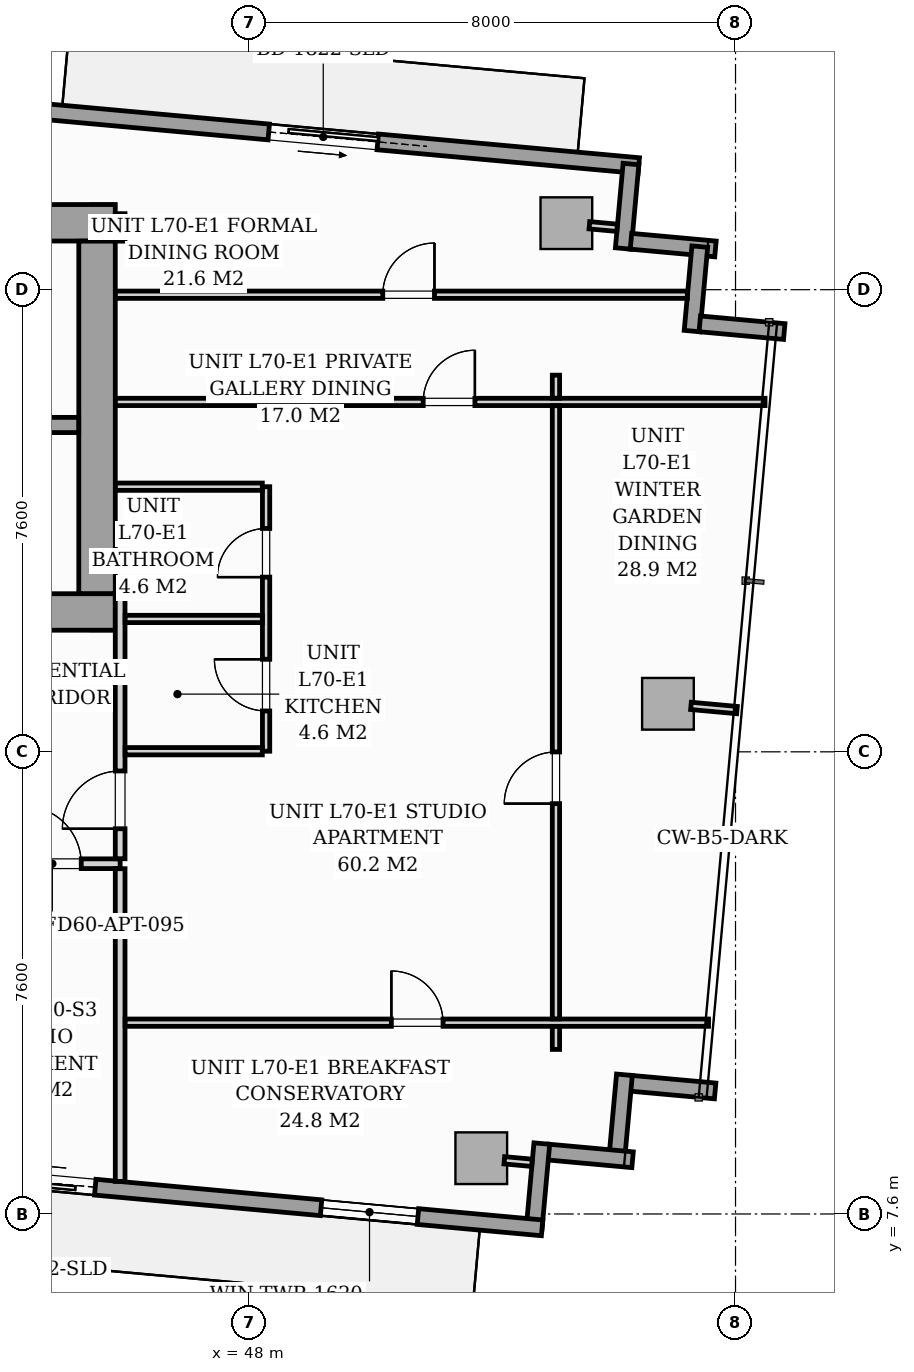
"""IFC4 building model, lengths in metres.
Left out: names, types, materials, properties, quantities, classifications, styles, units other than length and angle.
Written with IfcOpenShell. Run it as: python <this file> out.ifc"""

import sys

from ifc_helpers import new_model, si_unit, direction, frame, frame_2d, origin, origin_2d, place, context, subcontext, project, spatial, rectangle, i_section, extrude, source, transform, mapped, element, fill, save


model = new_model("IFC4")
c1 = context("Model", 3, precision=1e-05, world=origin(), true_north=direction((0.0, 1.0)))
c2 = subcontext(c1, "Body", "Model", "MODEL_VIEW")
j1 = project(units=[si_unit("LENGTHUNIT", "METRE"), si_unit("PLANEANGLEUNIT", "RADIAN")], contexts=[c1])
p1 = place(None, origin())
s1 = spatial("IfcSite", under=j1, at=p1, CompositionType="ELEMENT")
p2 = place(p1, origin())
s2 = spatial("IfcBuilding", under=s1, at=p2, CompositionType="ELEMENT")
p3 = place(p2, frame((0.0, 0.0, 243.0)))
s3 = spatial("IfcBuildingStorey", under=s2, at=p3, CompositionType="ELEMENT", Elevation=243.0)
m1 = source(origin(), c2, "Body", "SweptSolid", [
    extrude(i_section(OverallWidth=0.409, OverallDepth=0.425, WebThickness=0.033, FlangeThickness=0.052, FilletRadius=0.018, at=origin_2d()), origin(), (0.0, 0.0, 1.0), 3.296),
])
for number, where, z_axis, x_axis in (
    (1, (45.6, 17.4, 0.002), (0.0, 0.0, 1.0), (1.0, 0.0, 0.0)),
    (2, (45.6, 24.0, 0.002), (0.0, 0.0, 1.0), (1.0, 0.0, 0.0)),
):
    element("IfcColumn", number, at=place(p3, frame(where, z_axis=z_axis, x_axis=x_axis)), inside=s3, PredefinedType="PILASTER", context=c2, shape_type="MappedRepresentation", body=[
        mapped(m1, transform((0.0, 0.0, 0.0), scale=1.0)),
    ])
m2 = source(origin(), c2, "Body", "SweptSolid", [
    extrude(rectangle(XDim=0.85, YDim=0.85, at=origin_2d()), origin(), (0.0, 0.0, 1.0), 3.296),
])
for number, where, z_axis, x_axis in (
    (3, (51.819, 8.517, 0.002), (0.0, 0.0, 1.0), (0.996, -0.091, 0.0)),
    (4, (53.218, 23.894, 0.002), (0.0, 0.0, 1.0), (0.996, -0.091, 0.0)),
    (5, (54.889, 15.99, 0.002), (0.0, 0.0, 1.0), (0.996, -0.091, 0.0)),
):
    element("IfcColumn", number, at=place(p3, frame(where, z_axis=z_axis, x_axis=x_axis)), inside=s3, PredefinedType="COLUMN", context=c2, shape_type="MappedRepresentation", body=[
        mapped(m2, transform((0.0, 0.0, 0.0), scale=1.0)),
    ])
p4 = place(p3, frame((39.839, 26.166, 0.0), z_axis=(0.0, 0.0, 1.0), x_axis=(0.995884447498, -0.090632043071, 0.0)))
e6 = element("IfcWall", 6, at=p4, inside=s3, PredefinedType="STANDARD", context=c2, shape_type="SweptSolid", body=[
    extrude(rectangle(XDim=14.63, YDim=0.26, at=frame_2d((7.315, 0.0))), origin(), (0.0, 0.0, 1.0), 3.04),
])
p5 = place(p4, frame((8.52, 0.0, 0.0)))
e7 = element("IfcOpeningElement", 7, at=p5, cuts=e6, PredefinedType="OPENING", context=c2, shape_type="SweptSolid", body=[
    extrude(rectangle(XDim=1.8, YDim=2.06, at=frame_2d((0.9, 1.03))), frame((0.0, 0.14, 0.0), z_axis=(0.0, -1.0, 0.0), x_axis=(1.0, 0.0, 0.0)), (0.0, 0.0, 1.0), 0.28),
])
p6 = place(p4, frame((0.7, 0.0, 0.65)))
e8 = element("IfcOpeningElement", 8, at=p6, cuts=e6, PredefinedType="OPENING", context=c2, shape_type="SweptSolid", body=[
    extrude(rectangle(XDim=1.6, YDim=1.5, at=frame_2d((0.8, 0.75))), frame((0.0, 0.14, 0.0), z_axis=(0.0, -1.0, 0.0), x_axis=(1.0, 0.0, 0.0)), (0.0, 0.0, 1.0), 0.28),
])
p7 = place(p3, frame((54.281, 24.866, 0.0), z_axis=(0.0, 0.0, 1.0), x_axis=(-0.090661991521, -0.995881721538, 0.0)))
e9 = element("IfcWall", 9, at=p7, inside=s3, PredefinedType="STANDARD", context=c2, shape_type="SweptSolid", body=[
    extrude(rectangle(XDim=1.395, YDim=0.26, at=frame_2d((0.698, 0.0))), origin(), (0.0, 0.0, 1.0), 3.04),
])
for number, where, z_axis, x_axis in (
    (10, (54.281, 23.596, 0.0), (0.0, 0.0, 1.0), (0.996, -0.091, 0.0)),
    (11, (55.412, 23.508, 0.0), (0.0, 0.0, 1.0), (-0.091, -0.996, 0.0)),
    (12, (55.412, 22.238, 0.0), (0.0, 0.0, 1.0), (0.996, -0.091, 0.0)),
):
    element("IfcWall", number, at=place(p3, frame(where, z_axis=z_axis, x_axis=x_axis)), inside=s3, PredefinedType="STANDARD", context=c2, shape_type="SweptSolid", body=[
        extrude(rectangle(XDim=1.395, YDim=0.26, at=frame_2d((0.698, 0.0))), origin(), (0.0, 0.0, 1.0), 3.04),
    ])
for number, where, z_axis, x_axis in (
    (13, (55.665, 9.623, 0.0), (0.0, 0.0, 1.0), (-0.996, 0.091, 0.0)),
    (14, (54.173, 9.889, 0.0), (0.0, 0.0, 1.0), (-0.091, -0.996, 0.0)),
):
    element("IfcWall", number, at=place(p3, frame(where, z_axis=z_axis, x_axis=x_axis)), inside=s3, PredefinedType="STANDARD", context=c2, shape_type="SweptSolid", body=[
        extrude(rectangle(XDim=1.395, YDim=0.26, at=frame_2d((0.698, 0.0))), origin(), (0.0, 0.0, 1.0), 3.04),
    ])
for number, where, z_axis, x_axis in (
    (15, (54.307, 8.492, 0.0), (0.0, 0.0, 1.0), (-0.996, 0.091, 0.0)),
    (16, (52.815, 8.758, 0.0), (0.0, 0.0, 1.0), (-0.091, -0.996, 0.0)),
):
    element("IfcWall", number, at=place(p3, frame(where, z_axis=z_axis, x_axis=x_axis)), inside=s3, PredefinedType="STANDARD", context=c2, shape_type="SweptSolid", body=[
        extrude(rectangle(XDim=1.395, YDim=0.26, at=frame_2d((0.698, 0.0))), origin(), (0.0, 0.0, 1.0), 3.04),
    ])
p8 = place(p3, frame((52.819, 7.372, 0.0), z_axis=(0.0, 0.0, 1.0), x_axis=(-0.995884447498, 0.090632043071, 0.0)))
e17 = element("IfcWall", 17, at=p8, inside=s3, PredefinedType="STANDARD", context=c2, shape_type="SweptSolid", body=[
    extrude(rectangle(XDim=14.63, YDim=0.26, at=frame_2d((7.315, 0.0))), origin(), (0.0, 0.0, 1.0), 3.04),
])
p9 = place(p8, frame((7.379, 0.0, 0.0)))
e18 = element("IfcOpeningElement", 18, at=p9, cuts=e17, PredefinedType="OPENING", context=c2, shape_type="SweptSolid", body=[
    extrude(rectangle(XDim=1.8, YDim=2.06, at=frame_2d((0.9, 1.03))), frame((0.0, 0.14, 0.0), z_axis=(0.0, -1.0, 0.0), x_axis=(1.0, 0.0, 0.0)), (0.0, 0.0, 1.0), 0.28),
])
p10 = place(p8, frame((2.05, 0.0, 0.65)))
e19 = element("IfcOpeningElement", 19, at=p10, cuts=e17, PredefinedType="OPENING", context=c2, shape_type="SweptSolid", body=[
    extrude(rectangle(XDim=1.6, YDim=1.5, at=frame_2d((0.8, 0.75))), frame((0.0, 0.14, 0.0), z_axis=(0.0, -1.0, 0.0), x_axis=(1.0, 0.0, 0.0)), (0.0, 0.0, 1.0), 0.28),
])
p11 = place(p3, frame((26.2, 17.5, 0.0), z_axis=(0.0, 0.0, 1.0), x_axis=(1.0, 0.0, 0.0)))
e20 = element("IfcWall", 20, at=p11, inside=s3, PredefinedType="SHEAR", context=c2, shape_type="SweptSolid", body=[
    extrude(rectangle(XDim=19.6, YDim=0.6, at=frame_2d((9.8, 0.0))), origin(), (0.0, 0.0, 1.0), 3.3),
])
p12 = place(p11, frame((0.95, 0.0, 0.0)))
e21 = element("IfcOpeningElement", 21, at=p12, cuts=e20, PredefinedType="OPENING", context=c2, shape_type="SweptSolid", body=[
    extrude(rectangle(XDim=0.95, YDim=2.06, at=frame_2d((0.475, 1.03))), frame((0.0, 0.31, 0.0), z_axis=(0.0, -1.0, 0.0), x_axis=(1.0, 0.0, 0.0)), (0.0, 0.0, 1.0), 0.62),
])
p13 = place(p11, frame((9.38, 0.0, 0.0)))
e22 = element("IfcOpeningElement", 22, at=p13, cuts=e20, PredefinedType="OPENING", context=c2, shape_type="SweptSolid", body=[
    extrude(rectangle(XDim=0.85, YDim=2.0, at=frame_2d((0.425, 1.0))), frame((0.0, 0.31, 0.0), z_axis=(0.0, -1.0, 0.0), x_axis=(1.0, 0.0, 0.0)), (0.0, 0.0, 1.0), 0.62),
])
p14 = place(p11, frame((17.55, 0.0, 0.0)))
e23 = element("IfcOpeningElement", 23, at=p14, cuts=e20, PredefinedType="OPENING", context=c2, shape_type="SweptSolid", body=[
    extrude(rectangle(XDim=0.95, YDim=2.06, at=frame_2d((0.475, 1.03))), frame((0.0, 0.31, 0.0), z_axis=(0.0, -1.0, 0.0), x_axis=(1.0, 0.0, 0.0)), (0.0, 0.0, 1.0), 0.62),
])
p15 = place(p3, frame((26.2, 23.9, 0.0), z_axis=(0.0, 0.0, 1.0), x_axis=(1.0, 0.0, 0.0)))
e24 = element("IfcWall", 24, at=p15, inside=s3, PredefinedType="SHEAR", context=c2, shape_type="SweptSolid", body=[
    extrude(rectangle(XDim=19.6, YDim=0.6, at=frame_2d((9.8, 0.0))), origin(), (0.0, 0.0, 1.0), 3.3),
])
p16 = place(p3, frame((45.5, 17.802, 0.0), z_axis=(0.0, 0.0, 1.0), x_axis=(0.0, 1.0, 0.0)))
e25 = element("IfcWall", 25, at=p16, inside=s3, PredefinedType="SHEAR", context=c2, shape_type="SweptSolid", body=[
    extrude(rectangle(XDim=5.796, YDim=0.6, at=frame_2d((2.898, 0.0))), origin(), (0.0, 0.0, 1.0), 3.3),
])
p17 = place(p3, frame((37.05, 20.575, 0.0), z_axis=(0.0, 0.0, 1.0), x_axis=(1.0, 0.0, 0.0)))
e26 = element("IfcWall", 26, at=p17, inside=s3, PredefinedType="SOLIDWALL", context=c2, shape_type="SweptSolid", body=[
    extrude(rectangle(XDim=8.148, YDim=0.25, at=frame_2d((4.074, 0.0))), origin(), (0.0, 0.0, 1.0), 3.3),
])
p18 = place(p17, frame((6.6, 0.0, 0.0)))
e27 = element("IfcOpeningElement", 27, at=p18, cuts=e26, PredefinedType="OPENING", context=c2, shape_type="SweptSolid", body=[
    extrude(rectangle(XDim=0.95, YDim=2.06, at=frame_2d((0.475, 1.03))), frame((0.0, 0.135, 0.0), z_axis=(0.0, -1.0, 0.0), x_axis=(1.0, 0.0, 0.0)), (0.0, 0.0, 1.0), 0.27),
])
p19 = place(p3, frame((26.12, 13.36, 0.0), z_axis=(0.0, 0.0, 1.0), x_axis=(1.0, 0.0, 0.0)))
e28 = element("IfcWall", 28, at=p19, inside=s3, PredefinedType="PARTITIONING", context=c2, shape_type="SweptSolid", body=[
    extrude(rectangle(XDim=19.76, YDim=0.16, at=frame_2d((9.88, 0.0))), origin(), (0.0, 0.0, 1.0), 2.55),
])
p20 = place(p19, frame((5.221, 0.0, 0.0)))
e29 = element("IfcOpeningElement", 29, at=p20, cuts=e28, PredefinedType="OPENING", context=c2, shape_type="SweptSolid", body=[
    extrude(rectangle(XDim=0.95, YDim=2.06, at=frame_2d((0.475, 1.03))), frame((0.0, 0.09, 0.0), z_axis=(0.0, -1.0, 0.0), x_axis=(1.0, 0.0, 0.0)), (0.0, 0.0, 1.0), 0.18),
])
p21 = place(p19, frame((8.074, 0.0, 0.0)))
e30 = element("IfcOpeningElement", 30, at=p21, cuts=e28, PredefinedType="OPENING", context=c2, shape_type="SweptSolid", body=[
    extrude(rectangle(XDim=0.95, YDim=2.06, at=frame_2d((0.475, 1.03))), frame((0.0, 0.09, 0.0), z_axis=(0.0, -1.0, 0.0), x_axis=(1.0, 0.0, 0.0)), (0.0, 0.0, 1.0), 0.18),
])
p22 = place(p19, frame((18.17, 0.0, 0.0)))
e31 = element("IfcOpeningElement", 31, at=p22, cuts=e28, PredefinedType="OPENING", context=c2, shape_type="SweptSolid", body=[
    extrude(rectangle(XDim=0.95, YDim=2.06, at=frame_2d((0.475, 1.03))), frame((0.0, 0.09, 0.0), z_axis=(0.0, -1.0, 0.0), x_axis=(1.0, 0.0, 0.0)), (0.0, 0.0, 1.0), 0.18),
])
p23 = place(p3, frame((45.88, 8.136, 0.0), z_axis=(0.0, 0.0, 1.0), x_axis=(0.0, 1.0, 0.0)))
e32 = element("IfcWall", 32, at=p23, inside=s3, PredefinedType="PARTITIONING", context=c2, shape_type="SweptSolid", body=[
    extrude(rectangle(XDim=5.142, YDim=0.16, at=frame_2d((2.571, 0.0))), origin(), (0.0, 0.0, 1.0), 3.04),
])
p24 = place(p3, frame((45.88, 13.442, 0.0), z_axis=(0.0, 0.0, 1.0), x_axis=(0.0, 1.0, 0.0)))
e33 = element("IfcWall", 33, at=p24, inside=s3, PredefinedType="PARTITIONING", context=c2, shape_type="SweptSolid", body=[
    extrude(rectangle(XDim=4.36, YDim=0.16, at=frame_2d((2.18, 0.0))), origin(), (0.0, 0.0, 1.0), 3.04),
])
p25 = place(p24, frame((0.493, 0.0, 0.0)))
e34 = element("IfcOpeningElement", 34, at=p25, cuts=e33, PredefinedType="OPENING", context=c2, shape_type="SweptSolid", body=[
    extrude(rectangle(XDim=0.95, YDim=2.06, at=frame_2d((0.475, 1.03))), frame((0.0, 0.09, 0.0), z_axis=(0.0, -1.0, 0.0), x_axis=(1.0, 0.0, 0.0)), (0.0, 0.0, 1.0), 0.18),
])
p26 = place(p3, frame((45.88, 23.598, 0.0), z_axis=(0.0, 0.0, 1.0), x_axis=(0.0, 1.0, 0.0)))
e35 = element("IfcWall", 35, at=p26, inside=s3, PredefinedType="PARTITIONING", context=c2, shape_type="SweptSolid", body=[
    extrude(rectangle(XDim=0.452, YDim=0.16, at=frame_2d((0.226, 0.0))), origin(), (0.0, 0.0, 1.0), 3.04),
])
p27 = place(p3, frame((48.28, 15.21, 0.0), z_axis=(0.0, 0.0, 1.0), x_axis=(0.0, 1.0, 0.0)))
e36 = element("IfcWall", 36, at=p27, inside=s3, PredefinedType="PARTITIONING", context=c2, shape_type="SweptSolid", body=[
    extrude(rectangle(XDim=4.35, YDim=0.12, at=frame_2d((2.175, 0.0))), origin(), (0.0, 0.0, 1.0), 3.04),
])
p28 = place(p27, frame((0.662, 0.0, 0.0)))
e37 = element("IfcOpeningElement", 37, at=p28, cuts=e36, PredefinedType="OPENING", context=c2, shape_type="SweptSolid", body=[
    extrude(rectangle(XDim=0.85, YDim=2.05, at=frame_2d((0.425, 1.025))), frame((0.0, 0.07, 0.0), z_axis=(0.0, -1.0, 0.0), x_axis=(1.0, 0.0, 0.0)), (0.0, 0.0, 1.0), 0.14),
])
p29 = place(p27, frame((2.863, 0.0, 0.0)))
e38 = element("IfcOpeningElement", 38, at=p29, cuts=e36, PredefinedType="OPENING", context=c2, shape_type="SweptSolid", body=[
    extrude(rectangle(XDim=0.8, YDim=2.02, at=frame_2d((0.4, 1.01))), frame((0.0, 0.07, 0.0), z_axis=(0.0, -1.0, 0.0), x_axis=(1.0, 0.0, 0.0)), (0.0, 0.0, 1.0), 0.14),
])
p30 = place(p3, frame((45.962, 17.385, 0.0), z_axis=(0.0, 0.0, 1.0), x_axis=(1.0, 0.0, 0.0)))
e39 = element("IfcWall", 39, at=p30, inside=s3, PredefinedType="PARTITIONING", context=c2, shape_type="SweptSolid", body=[
    extrude(rectangle(XDim=2.256, YDim=0.12, at=frame_2d((1.128, 0.0))), origin(), (0.0, 0.0, 1.0), 2.381),
])
p31 = place(p3, frame((45.962, 15.21, 0.0), z_axis=(0.0, 0.0, 1.0), x_axis=(1.0, 0.0, 0.0)))
e40 = element("IfcWall", 40, at=p31, inside=s3, PredefinedType="PARTITIONING", context=c2, shape_type="SweptSolid", body=[
    extrude(rectangle(XDim=2.256, YDim=0.12, at=frame_2d((1.128, 0.0))), origin(), (0.0, 0.0, 1.0), 3.04),
])
p32 = place(p3, frame((45.802, 19.56, 0.0), z_axis=(0.0, 0.0, 1.0), x_axis=(1.0, 0.0, 0.0)))
e41 = element("IfcWall", 41, at=p32, inside=s3, PredefinedType="PARTITIONING", context=c2, shape_type="SweptSolid", body=[
    extrude(rectangle(XDim=2.416, YDim=0.12, at=frame_2d((1.208, 0.0))), origin(), (0.0, 0.0, 1.0), 3.04),
])
p33 = place(p3, frame((45.802, 22.717, 0.0), z_axis=(0.0, 0.0, 1.0), x_axis=(1.0, 0.0, 0.0)))
e42 = element("IfcWall", 42, at=p33, inside=s3, PredefinedType="PARTITIONING", context=c2, shape_type="SweptSolid", body=[
    extrude(rectangle(XDim=9.406, YDim=0.12, at=frame_2d((4.703, 0.0))), origin(), (0.0, 0.0, 1.0), 3.04),
])
p34 = place(p33, frame((4.397, 0.0, 0.0)))
e43 = element("IfcOpeningElement", 43, at=p34, cuts=e42, PredefinedType="OPENING", context=c2, shape_type="SweptSolid", body=[
    extrude(rectangle(XDim=0.85, YDim=2.05, at=frame_2d((0.425, 1.025))), frame((0.0, 0.07, 0.0), z_axis=(0.0, -1.0, 0.0), x_axis=(1.0, 0.0, 0.0)), (0.0, 0.0, 1.0), 0.14),
])
p35 = place(p3, frame((45.962, 10.746, 0.0), z_axis=(0.0, 0.0, 1.0), x_axis=(1.0, 0.0, 0.0)))
e44 = element("IfcWall", 44, at=p35, inside=s3, PredefinedType="PARTITIONING", context=c2, shape_type="SweptSolid", body=[
    extrude(rectangle(XDim=9.594, YDim=0.12, at=frame_2d((4.797, 0.0))), origin(), (0.0, 0.0, 1.0), 3.04),
])
p36 = place(p35, frame((4.378, 0.0, 0.0)))
e45 = element("IfcOpeningElement", 45, at=p36, cuts=e44, PredefinedType="OPENING", context=c2, shape_type="SweptSolid", body=[
    extrude(rectangle(XDim=0.85, YDim=2.05, at=frame_2d((0.425, 1.025))), frame((0.0, 0.07, 0.0), z_axis=(0.0, -1.0, 0.0), x_axis=(1.0, 0.0, 0.0)), (0.0, 0.0, 1.0), 0.14),
])
p37 = place(p3, frame((45.802, 20.954, 0.0), z_axis=(0.0, 0.0, 1.0), x_axis=(1.0, 0.0, 0.0)))
e46 = element("IfcWall", 46, at=p37, inside=s3, PredefinedType="PARTITIONING", context=c2, shape_type="SweptSolid", body=[
    extrude(rectangle(XDim=10.683, YDim=0.12, at=frame_2d((5.342, 0.0))), origin(), (0.0, 0.0, 1.0), 3.04),
])
p38 = place(p37, frame((5.062, 0.0, 0.0)))
e47 = element("IfcOpeningElement", 47, at=p38, cuts=e46, PredefinedType="OPENING", context=c2, shape_type="SweptSolid", body=[
    extrude(rectangle(XDim=0.85, YDim=2.05, at=frame_2d((0.425, 1.025))), frame((0.0, 0.07, 0.0), z_axis=(0.0, -1.0, 0.0), x_axis=(1.0, 0.0, 0.0)), (0.0, 0.0, 1.0), 0.14),
])
p39 = place(p3, frame((53.047, 10.306, 0.0), z_axis=(0.0, 0.0, 1.0), x_axis=(0.0, 1.0, 0.0)))
e48 = element("IfcWall", 48, at=p39, inside=s3, PredefinedType="PARTITIONING", context=c2, shape_type="SweptSolid", body=[
    extrude(rectangle(XDim=0.378, YDim=0.12, at=frame_2d((0.189, 0.0))), origin(), (0.0, 0.0, 1.0), 3.04),
])
p40 = place(p3, frame((53.047, 10.808, 0.0), z_axis=(0.0, 0.0, 1.0), x_axis=(0.0, 1.0, 0.0)))
e49 = element("IfcWall", 49, at=p40, inside=s3, PredefinedType="PARTITIONING", context=c2, shape_type="SweptSolid", body=[
    extrude(rectangle(XDim=10.084, YDim=0.12, at=frame_2d((5.042, 0.0))), origin(), (0.0, 0.0, 1.0), 3.04),
])
p41 = place(p40, frame((3.54, 0.0, 0.0)))
e50 = element("IfcOpeningElement", 50, at=p41, cuts=e49, PredefinedType="OPENING", context=c2, shape_type="SweptSolid", body=[
    extrude(rectangle(XDim=0.85, YDim=2.05, at=frame_2d((0.425, 1.025))), frame((0.0, 0.07, 0.0), z_axis=(0.0, -1.0, 0.0), x_axis=(1.0, 0.0, 0.0)), (0.0, 0.0, 1.0), 0.14),
])
p42 = place(p3, frame((53.047, 21.016, 0.0), z_axis=(0.0, 0.0, 1.0), x_axis=(0.0, 1.0, 0.0)))
e51 = element("IfcWall", 51, at=p42, inside=s3, PredefinedType="PARTITIONING", context=c2, shape_type="SweptSolid", body=[
    extrude(rectangle(XDim=0.378, YDim=0.12, at=frame_2d((0.189, 0.0))), origin(), (0.0, 0.0, 1.0), 3.04),
])
for number, where, z_axis, x_axis in (
    (52, (52.197, 8.483, 0.0), (0.0, 0.0, 1.0), (0.996, -0.091, 0.0)),
    (53, (53.597, 23.859, 0.0), (0.0, 0.0, 1.0), (0.996, -0.091, 0.0)),
):
    element("IfcWall", number, at=place(p3, frame(where, z_axis=z_axis, x_axis=x_axis)), inside=s3, PredefinedType="PARTITIONING", context=c2, shape_type="SweptSolid", body=[
        extrude(rectangle(XDim=0.458, YDim=0.12, at=frame_2d((0.229, 0.0))), origin(), (0.0, 0.0, 1.0), 3.04),
    ])
p43 = place(p3, frame((55.267, 15.955, 0.0), z_axis=(0.0, 0.0, 1.0), x_axis=(0.995887938321, -0.09059367697, 0.0)))
e54 = element("IfcWall", 54, at=p43, inside=s3, PredefinedType="PARTITIONING", context=c2, shape_type="SweptSolid", body=[
    extrude(rectangle(XDim=0.76, YDim=0.12, at=frame_2d((0.38, 0.0))), origin(), (0.0, 0.0, 1.0), 3.04),
])
m3 = source(origin(), c2, "Body", "SweptSolid", [
    extrude(rectangle(XDim=1.8, YDim=2.06, at=frame_2d((0.9, 1.03))), frame((0.0, 0.025, 0.0), z_axis=(0.0, -1.0, 0.0), x_axis=(1.0, 0.0, 0.0)), (0.0, 0.0, 1.0), 0.05),
])
p44 = place(p5, origin())
e55 = element("IfcDoor", 55, at=p44, inside=s3, OperationType="SLIDING_TO_RIGHT", PredefinedType="DOOR", context=c2, shape_type="MappedRepresentation", body=[
    mapped(m3, transform((0.0, 0.0, 0.0), scale=1.0)),
])
fill(e7, e55)
p45 = place(p9, origin())
e56 = element("IfcDoor", 56, at=p45, inside=s3, OperationType="SLIDING_TO_RIGHT", PredefinedType="DOOR", context=c2, shape_type="MappedRepresentation", body=[
    mapped(m3, transform((0.0, 0.0, 0.0), scale=1.0)),
])
fill(e18, e56)
m4 = source(origin(), c2, "Body", "SweptSolid", [
    extrude(rectangle(XDim=1.6, YDim=1.5, at=frame_2d((0.8, 0.75))), frame((0.0, 0.03, 0.0), z_axis=(0.0, -1.0, 0.0), x_axis=(1.0, 0.0, 0.0)), (0.0, 0.0, 1.0), 0.06),
])
p46 = place(p10, origin())
e57 = element("IfcWindow", 57, at=p46, inside=s3, PartitioningType="SINGLE_PANEL", PredefinedType="WINDOW", context=c2, shape_type="MappedRepresentation", body=[
    mapped(m4, transform((0.0, 0.0, 0.0), scale=1.0)),
])
fill(e19, e57)
m5 = source(origin(), c2, "Body", "SweptSolid", [
    extrude(rectangle(XDim=0.95, YDim=2.06, at=frame_2d((0.475, 1.03))), frame((0.0, 0.025, 0.0), z_axis=(0.0, -1.0, 0.0), x_axis=(1.0, 0.0, 0.0)), (0.0, 0.0, 1.0), 0.05),
])
p47 = place(p22, origin())
e58 = element("IfcDoor", 58, at=p47, inside=s3, OperationType="SINGLE_SWING_LEFT", PredefinedType="DOOR", context=c2, shape_type="MappedRepresentation", body=[
    mapped(m5, transform((0.0, 0.0, 0.0), scale=1.0)),
])
fill(e31, e58)
p48 = place(p25, origin())
e59 = element("IfcDoor", 59, at=p48, inside=s3, OperationType="SINGLE_SWING_LEFT", PredefinedType="DOOR", context=c2, shape_type="MappedRepresentation", body=[
    mapped(m5, transform((0.0, 0.0, 0.0), scale=1.0)),
])
fill(e34, e59)
m6 = source(origin(), c2, "Body", "SweptSolid", [
    extrude(rectangle(XDim=0.85, YDim=2.05, at=frame_2d((0.425, 1.025))), frame((0.0, 0.025, 0.0), z_axis=(0.0, -1.0, 0.0), x_axis=(1.0, 0.0, 0.0)), (0.0, 0.0, 1.0), 0.05),
])
p49 = place(p28, origin())
e60 = element("IfcDoor", 60, at=p49, inside=s3, OperationType="SINGLE_SWING_RIGHT", PredefinedType="DOOR", context=c2, shape_type="MappedRepresentation", body=[
    mapped(m6, transform((0.0, 0.0, 0.0), scale=1.0)),
])
fill(e37, e60)
m7 = source(origin(), c2, "Body", "SweptSolid", [
    extrude(rectangle(XDim=0.8, YDim=2.02, at=frame_2d((0.4, 1.01))), frame((0.0, 0.025, 0.0), z_axis=(0.0, -1.0, 0.0), x_axis=(1.0, 0.0, 0.0)), (0.0, 0.0, 1.0), 0.05),
])
p50 = place(p29, origin())
e61 = element("IfcDoor", 61, at=p50, inside=s3, OperationType="SINGLE_SWING_LEFT", PredefinedType="DOOR", context=c2, shape_type="MappedRepresentation", body=[
    mapped(m7, transform((0.0, 0.0, 0.0), scale=1.0)),
])
fill(e38, e61)
p51 = place(p34, origin())
e62 = element("IfcDoor", 62, at=p51, inside=s3, OperationType="SINGLE_SWING_RIGHT", PredefinedType="DOOR", context=c2, shape_type="MappedRepresentation", body=[
    mapped(m6, transform((0.0, 0.0, 0.0), scale=1.0)),
])
fill(e43, e62)
p52 = place(p36, origin())
e63 = element("IfcDoor", 63, at=p52, inside=s3, OperationType="SINGLE_SWING_LEFT", PredefinedType="DOOR", context=c2, shape_type="MappedRepresentation", body=[
    mapped(m6, transform((0.0, 0.0, 0.0), scale=1.0)),
])
fill(e45, e63)
p53 = place(p38, origin())
e64 = element("IfcDoor", 64, at=p53, inside=s3, OperationType="SINGLE_SWING_RIGHT", PredefinedType="DOOR", context=c2, shape_type="MappedRepresentation", body=[
    mapped(m6, transform((0.0, 0.0, 0.0), scale=1.0)),
])
fill(e47, e64)
p54 = place(p41, origin())
e65 = element("IfcDoor", 65, at=p54, inside=s3, OperationType="SINGLE_SWING_LEFT", PredefinedType="DOOR", context=c2, shape_type="MappedRepresentation", body=[
    mapped(m6, transform((0.0, 0.0, 0.0), scale=1.0)),
])
fill(e50, e65)
save(model, sys.argv[1])
